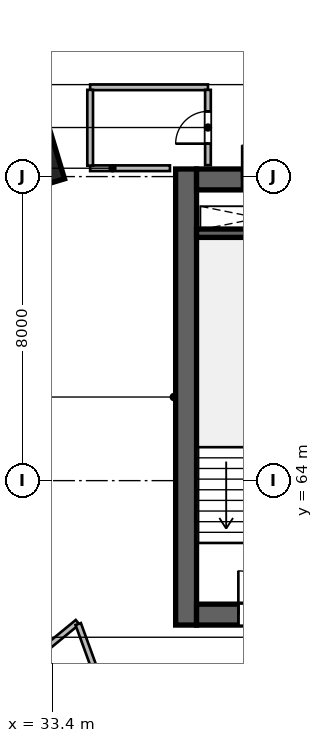
"""IFC4 building model, lengths in metres.
Left out: names, types, materials, properties, quantities, classifications, styles, units other than length and angle.
Written with IfcOpenShell. Run it as: python <this file> out.ifc"""

import sys

from ifc_helpers import new_model, si_unit, direction, frame, frame_2d, origin, origin_2d, place, context, subcontext, project, spatial, rectangle, extrude, source, transform, mapped, element, fill, save


model = new_model("IFC4")
c1 = context("Model", 3, precision=1e-05, world=origin(), true_north=direction((0.0, 1.0)))
c2 = subcontext(c1, "Body", "Model", "MODEL_VIEW")
j1 = project(units=[si_unit("LENGTHUNIT", "METRE"), si_unit("PLANEANGLEUNIT", "RADIAN")], contexts=[c1])
p1 = place(None, origin())
s1 = spatial("IfcSite", under=j1, at=p1, CompositionType="ELEMENT")
p2 = place(p1, origin())
s2 = spatial("IfcBuilding", under=s1, at=p2, CompositionType="ELEMENT")
p3 = place(p2, frame((0.0, 0.0, 53.4)))
s3 = spatial("IfcBuildingStorey", under=s2, at=p3, CompositionType="ELEMENT", Elevation=53.4)
m1 = source(origin(), c2, "Body", "SweptSolid", [
    extrude(rectangle(XDim=12.0, YDim=0.55, at=frame_2d((6.0, 0.0))), origin(), (0.0, 0.0, 1.0), 3.6),
])
p4 = place(p3, frame((36.925, 60.2, 0.0), z_axis=(0.0, 0.0, 1.0), x_axis=(0.0, 1.0, 0.0)))
e1 = element("IfcWall", 1, at=p4, inside=s3, PredefinedType="SHEAR", context=c2, shape_type="MappedRepresentation", body=[
    mapped(m1, transform((0.0, 0.0, 0.0), scale=1.0)),
])
m2 = source(origin(), c2, "Body", "SweptSolid", [
    extrude(rectangle(XDim=21.6, YDim=0.55, at=frame_2d((10.8, 0.0))), origin(), (0.0, 0.0, 1.0), 3.6),
])
p5 = place(p3, frame((37.2, 60.475, 0.0), z_axis=(0.0, 0.0, 1.0), x_axis=(1.0, 0.0, 0.0)))
e2 = element("IfcWall", 2, at=p5, inside=s3, PredefinedType="SHEAR", context=c2, shape_type="MappedRepresentation", body=[
    mapped(m2, transform((0.0, 0.0, 0.0), scale=1.0)),
])
p6 = place(p5, frame((1.1, 0.0, 0.0)))
e3 = element("IfcOpeningElement", 3, at=p6, cuts=e2, PredefinedType="OPENING", context=c2, shape_type="SweptSolid", body=[
    extrude(rectangle(XDim=1.15, YDim=2.15, at=frame_2d((0.575, 1.075))), frame((0.0, 0.285, 0.0), z_axis=(0.0, -1.0, 0.0), x_axis=(1.0, 0.0, 0.0)), (0.0, 0.0, 1.0), 0.57),
])
p7 = place(p5, frame((19.5, 0.0, 0.0)))
e4 = element("IfcOpeningElement", 4, at=p7, cuts=e2, PredefinedType="OPENING", context=c2, shape_type="SweptSolid", body=[
    extrude(rectangle(XDim=0.9, YDim=2.1, at=frame_2d((0.45, 1.05))), frame((0.0, 0.285, 0.0), z_axis=(0.0, -1.0, 0.0), x_axis=(1.0, 0.0, 0.0)), (0.0, 0.0, 1.0), 0.57),
])
p8 = place(p5, frame((12.02, 0.0, 0.0)))
e5 = element("IfcOpeningElement", 5, at=p8, cuts=e2, PredefinedType="OPENING", context=c2, shape_type="SweptSolid", body=[
    extrude(rectangle(XDim=1.6, YDim=2.15, at=frame_2d((0.8, 1.075))), frame((0.0, 0.285, 0.0), z_axis=(0.0, -1.0, 0.0), x_axis=(1.0, 0.0, 0.0)), (0.0, 0.0, 1.0), 0.57),
])
p9 = place(p3, frame((37.2, 71.925, 0.0), z_axis=(0.0, 0.0, 1.0), x_axis=(1.0, 0.0, 0.0)))
e6 = element("IfcWall", 6, at=p9, inside=s3, PredefinedType="SHEAR", context=c2, shape_type="MappedRepresentation", body=[
    mapped(m2, transform((0.0, 0.0, 0.0), scale=1.0)),
])
p10 = place(p9, frame((1.2, 0.0, 0.0)))
e7 = element("IfcOpeningElement", 7, at=p10, cuts=e6, PredefinedType="OPENING", context=c2, shape_type="SweptSolid", body=[
    extrude(rectangle(XDim=0.9, YDim=2.1, at=frame_2d((0.45, 1.05))), frame((0.0, 0.285, 0.0), z_axis=(0.0, -1.0, 0.0), x_axis=(1.0, 0.0, 0.0)), (0.0, 0.0, 1.0), 0.57),
])
p11 = place(p9, frame((14.7, 0.0, 0.0)))
e8 = element("IfcOpeningElement", 8, at=p11, cuts=e6, PredefinedType="OPENING", context=c2, shape_type="SweptSolid", body=[
    extrude(rectangle(XDim=1.2, YDim=2.15, at=frame_2d((0.6, 1.075))), frame((0.0, 0.285, 0.0), z_axis=(0.0, -1.0, 0.0), x_axis=(1.0, 0.0, 0.0)), (0.0, 0.0, 1.0), 0.57),
])
p12 = place(p9, frame((4.15, 0.0, 0.0)))
e9 = element("IfcOpeningElement", 9, at=p12, cuts=e6, PredefinedType="OPENING", context=c2, shape_type="SweptSolid", body=[
    extrude(rectangle(XDim=1.3, YDim=2.15, at=frame_2d((0.65, 1.075))), frame((0.0, 0.285, 0.0), z_axis=(0.0, -1.0, 0.0), x_axis=(1.0, 0.0, 0.0)), (0.0, 0.0, 1.0), 0.57),
])
p13 = place(p9, frame((6.76, 0.0, 0.0)))
e10 = element("IfcOpeningElement", 10, at=p13, cuts=e6, PredefinedType="OPENING", context=c2, shape_type="SweptSolid", body=[
    extrude(rectangle(XDim=0.85, YDim=2.1, at=frame_2d((0.425, 1.05))), frame((0.0, 0.285, 0.0), z_axis=(0.0, -1.0, 0.0), x_axis=(1.0, 0.0, 0.0)), (0.0, 0.0, 1.0), 0.57),
])
p14 = place(p9, frame((8.76, 0.0, 0.0)))
e11 = element("IfcOpeningElement", 11, at=p14, cuts=e6, PredefinedType="OPENING", context=c2, shape_type="SweptSolid", body=[
    extrude(rectangle(XDim=0.85, YDim=2.1, at=frame_2d((0.425, 1.05))), frame((0.0, 0.285, 0.0), z_axis=(0.0, -1.0, 0.0), x_axis=(1.0, 0.0, 0.0)), (0.0, 0.0, 1.0), 0.57),
])
p15 = place(p9, frame((10.725, 0.0, 0.0)))
e12 = element("IfcOpeningElement", 12, at=p15, cuts=e6, PredefinedType="OPENING", context=c2, shape_type="SweptSolid", body=[
    extrude(rectangle(XDim=0.85, YDim=2.1, at=frame_2d((0.425, 1.05))), frame((0.0, 0.285, 0.0), z_axis=(0.0, -1.0, 0.0), x_axis=(1.0, 0.0, 0.0)), (0.0, 0.0, 1.0), 0.57),
])
m3 = source(origin(), c2, "Body", "SweptSolid", [
    extrude(rectangle(XDim=3.27, YDim=0.22, at=frame_2d((1.635, 0.0))), origin(), (0.0, 0.0, 1.0), 3.6),
])
p16 = place(p3, frame((37.2, 70.51, 0.0), z_axis=(0.0, 0.0, 1.0), x_axis=(1.0, 0.0, 0.0)))
e13 = element("IfcWall", 13, at=p16, inside=s3, PredefinedType="SHEAR", context=c2, shape_type="MappedRepresentation", body=[
    mapped(m3, transform((0.0, 0.0, 0.0), scale=1.0)),
])
m4 = source(origin(), c2, "Body", "SweptSolid", [
    extrude(rectangle(XDim=1.5, YDim=1.5, at=origin_2d()), origin(), (0.0, 0.0, 1.0), 3.6),
])
p17 = place(p3, frame((32.791, 72.442, 0.0), z_axis=(0.0, 0.0, 1.0), x_axis=(-0.288697611798, 0.957420330337, 0.0)))
e14 = element("IfcColumn", 14, at=p17, inside=s3, PredefinedType="COLUMN", context=c2, shape_type="MappedRepresentation", body=[
    mapped(m4, transform((0.0, 0.0, 0.0), scale=1.0)),
])
m5 = source(origin(), c2, "Body", "SweptSolid", [
    extrude(rectangle(XDim=2.1, YDim=0.15, at=frame_2d((1.05, 0.0))), origin(), (0.0, 0.0, 1.0), 3.36),
])
p18 = place(p3, frame((34.4, 72.22, 0.0), z_axis=(0.0, 0.0, 1.0), x_axis=(1.0, 0.0, 0.0)))
e15 = element("IfcWall", 15, at=p18, inside=s3, PredefinedType="PARTITIONING", context=c2, shape_type="MappedRepresentation", body=[
    mapped(m5, transform((0.0, 0.0, 0.0), scale=1.0)),
])
m6 = source(origin(), c2, "Body", "SweptSolid", [
    extrude(rectangle(XDim=3.1, YDim=0.15, at=frame_2d((1.55, 0.0))), origin(), (0.0, 0.0, 1.0), 2.729),
])
p19 = place(p3, frame((34.4, 74.35, 0.0), z_axis=(0.0, 0.0, 1.0), x_axis=(1.0, 0.0, 0.0)))
e16 = element("IfcWall", 16, at=p19, inside=s3, PredefinedType="PARTITIONING", context=c2, shape_type="MappedRepresentation", body=[
    mapped(m6, transform((0.0, 0.0, 0.0), scale=1.0)),
])
m7 = source(origin(), c2, "Body", "SweptSolid", [
    extrude(rectangle(XDim=1.995, YDim=0.15, at=frame_2d((0.998, 0.0))), origin(), (0.0, 0.0, 1.0), 3.36),
])
p20 = place(p3, frame((34.4, 72.288, 0.0), z_axis=(0.0, 0.0, 1.0), x_axis=(0.0, 1.0, 0.0)))
e17 = element("IfcWall", 17, at=p20, inside=s3, PredefinedType="PARTITIONING", context=c2, shape_type="MappedRepresentation", body=[
    mapped(m7, transform((0.0, 0.0, 0.0), scale=1.0)),
])
m8 = source(origin(), c2, "Body", "SweptSolid", [
    extrude(rectangle(XDim=1.982, YDim=0.15, at=frame_2d((0.991, 0.0))), origin(), (0.0, 0.0, 1.0), 3.36),
])
p21 = place(p3, frame((37.5, 72.3, 0.0), z_axis=(0.0, 0.0, 1.0), x_axis=(0.0, 1.0, 0.0)))
e18 = element("IfcWall", 18, at=p21, inside=s3, PredefinedType="PARTITIONING", context=c2, shape_type="MappedRepresentation", body=[
    mapped(m8, transform((0.0, 0.0, 0.0), scale=1.0)),
])
p22 = place(p21, frame((0.566, 0.0, 0.0)))
e19 = element("IfcOpeningElement", 19, at=p22, cuts=e18, PredefinedType="OPENING", context=c2, shape_type="SweptSolid", body=[
    extrude(rectangle(XDim=0.85, YDim=2.1, at=frame_2d((0.425, 1.05))), frame((0.0, 0.085, 0.0), z_axis=(0.0, -1.0, 0.0), x_axis=(1.0, 0.0, 0.0)), (0.0, 0.0, 1.0), 0.17),
])
m9 = source(origin(), c2, "Body", "SweptSolid", [
    extrude(rectangle(XDim=6.721, YDim=0.15, at=frame_2d((3.361, 0.0))), origin(), (0.0, 0.0, 1.0), 3.36),
])
p23 = place(p3, frame((28.874, 56.01, 0.0), z_axis=(0.0, 0.0, 1.0), x_axis=(0.772828051199, 0.63461547671, 0.0)))
e20 = element("IfcWall", 20, at=p23, inside=s3, PredefinedType="PARTITIONING", context=c2, shape_type="MappedRepresentation", body=[
    mapped(m9, transform((0.0, 0.0, 0.0), scale=1.0)),
])
m10 = source(origin(), c2, "Body", "SweptSolid", [
    extrude(rectangle(XDim=12.196, YDim=0.15, at=frame_2d((6.098, 0.0))), origin(), (0.0, 0.0, 1.0), 3.36),
])
p24 = place(p3, frame((38.258, 48.766, 0.0), z_axis=(0.0, 0.0, 1.0), x_axis=(-0.342022711534, 0.939691686031, 0.0)))
e21 = element("IfcWall", 21, at=p24, inside=s3, PredefinedType="PARTITIONING", context=c2, shape_type="MappedRepresentation", body=[
    mapped(m10, transform((0.0, 0.0, 0.0), scale=1.0)),
])
m11 = source(origin(), c2, "Body", "SweptSolid", [
    extrude(rectangle(XDim=1.15, YDim=2.15, at=frame_2d((0.575, 1.075))), frame((0.0, 0.025, 0.0), z_axis=(0.0, -1.0, 0.0), x_axis=(1.0, 0.0, 0.0)), (0.0, 0.0, 1.0), 0.05),
])
p25 = place(p6, origin())
e22 = element("IfcDoor", 22, at=p25, inside=s3, OperationType="SINGLE_SWING_LEFT", PredefinedType="DOOR", context=c2, shape_type="MappedRepresentation", body=[
    mapped(m11, transform((0.0, 0.0, 0.0), scale=1.0)),
])
fill(e3, e22)
m12 = source(origin(), c2, "Body", "SweptSolid", [
    extrude(rectangle(XDim=0.9, YDim=2.1, at=frame_2d((0.45, 1.05))), frame((0.0, 0.025, 0.0), z_axis=(0.0, -1.0, 0.0), x_axis=(1.0, 0.0, 0.0)), (0.0, 0.0, 1.0), 0.05),
])
p26 = place(p10, origin())
e23 = element("IfcDoor", 23, at=p26, inside=s3, OperationType="SINGLE_SWING_LEFT", PredefinedType="DOOR", context=c2, shape_type="MappedRepresentation", body=[
    mapped(m12, transform((0.0, 0.0, 0.0), scale=1.0)),
])
fill(e7, e23)
m13 = source(origin(), c2, "Body", "SweptSolid", [
    extrude(rectangle(XDim=0.85, YDim=2.1, at=frame_2d((0.425, 1.05))), frame((0.0, 0.025, 0.0), z_axis=(0.0, -1.0, 0.0), x_axis=(1.0, 0.0, 0.0)), (0.0, 0.0, 1.0), 0.05),
])
p27 = place(p22, origin())
e24 = element("IfcDoor", 24, at=p27, inside=s3, OperationType="SINGLE_SWING_LEFT", PredefinedType="DOOR", context=c2, shape_type="MappedRepresentation", body=[
    mapped(m13, transform((0.0, 0.0, 0.0), scale=1.0)),
])
fill(e19, e24)
save(model, sys.argv[1])
